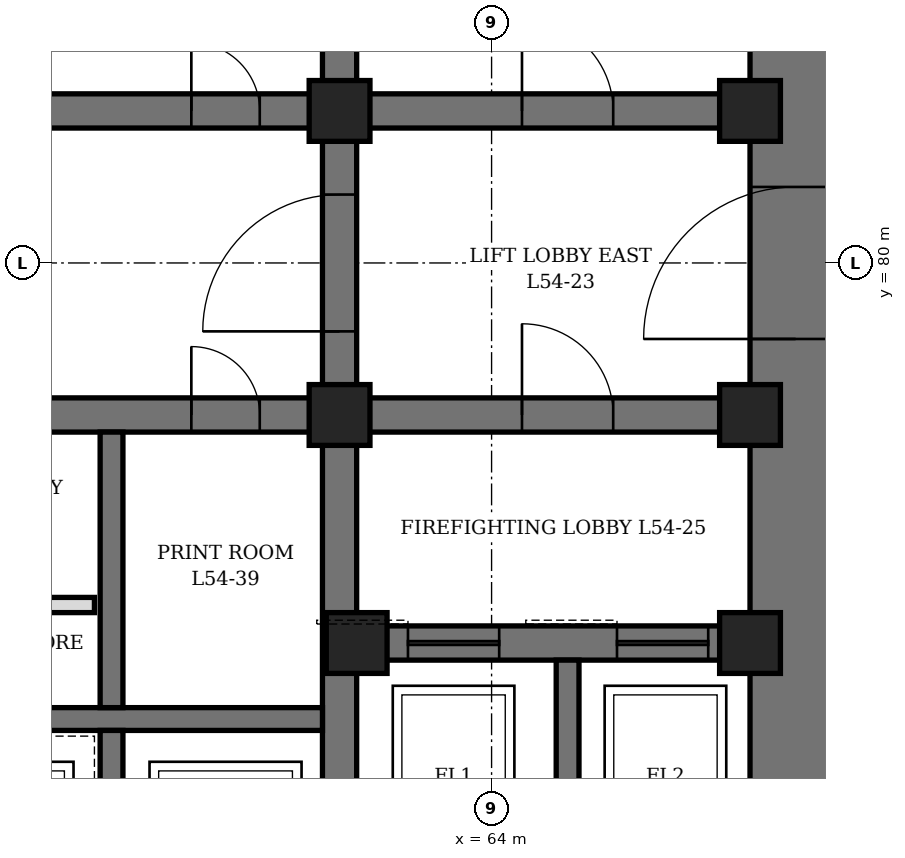
"""IFC4 building model, lengths in metres.
Left out: names, types, materials, properties, quantities, classifications, styles, units other than length and angle.
Written with IfcOpenShell. Run it as: python <this file> out.ifc"""

import sys

from ifc_helpers import new_model, si_unit, direction, frame, frame_2d, origin, origin_2d, place, context, subcontext, project, spatial, rectangle, hollow_rectangle, extrude, element, fill, save


model = new_model("IFC4")
c1 = context("Model", 3, precision=1e-05, world=origin(), true_north=direction((0.0, 1.0)))
c2 = subcontext(c1, "Body", "Model", "MODEL_VIEW")
j1 = project(units=[si_unit("LENGTHUNIT", "METRE"), si_unit("PLANEANGLEUNIT", "RADIAN")], contexts=[c1])
p1 = place(None, origin())
s1 = spatial("IfcSite", under=j1, at=p1, CompositionType="ELEMENT")
p2 = place(p1, origin())
s2 = spatial("IfcBuilding", under=s1, at=p2, CompositionType="ELEMENT")
p3 = place(p2, frame((0.0, 0.0, 240.1)))
s3 = spatial("IfcBuildingStorey", under=s2, at=p3, CompositionType="ELEMENT", Elevation=240.1)
p4 = place(p3, frame((68.0, 70.4, 0.0), z_axis=(0.0, 0.0, 1.0), x_axis=(0.0, 1.0, 0.0)))
e1 = element("IfcWall", 1, at=p4, inside=s3, PredefinedType="SHEAR", context=c2, shape_type="SweptSolid", body=[
    extrude(rectangle(XDim=19.2, YDim=1.2, at=frame_2d((9.6, 0.0))), origin(), (0.0, 0.0, 1.0), 4.2),
])
p5 = place(p4, frame((8.6, 0.0, 0.0)))
e2 = element("IfcOpeningElement", 2, at=p5, cuts=e1, PredefinedType="OPENING", context=c2, shape_type="SweptSolid", body=[
    extrude(rectangle(XDim=2.0, YDim=2.4, at=frame_2d((1.0, 1.2))), frame((0.0, 0.61, 0.0), z_axis=(0.0, -1.0, 0.0), x_axis=(1.0, 0.0, 0.0)), (0.0, 0.0, 1.0), 1.22),
])
p6 = place(p3, frame((62.0, 71.6, 0.0), z_axis=(0.0, 0.0, 1.0), x_axis=(0.0, 1.0, 0.0)))
e3 = element("IfcWall", 3, at=p6, inside=s3, PredefinedType="SHEAR", context=c2, shape_type="SweptSolid", body=[
    extrude(rectangle(XDim=16.8, YDim=0.45, at=frame_2d((8.4, 0.0))), origin(), (0.0, 0.0, 1.0), 4.2),
])
p7 = place(p6, frame((7.5, 0.0, 0.0)))
e4 = element("IfcOpeningElement", 4, at=p7, cuts=e3, PredefinedType="OPENING", context=c2, shape_type="SweptSolid", body=[
    extrude(rectangle(XDim=1.8, YDim=2.4, at=frame_2d((0.9, 1.2))), frame((0.0, 0.235, 0.0), z_axis=(0.0, -1.0, 0.0), x_axis=(1.0, 0.0, 0.0)), (0.0, 0.0, 1.0), 0.47),
])
p8 = place(p3, frame((62.225, 75.0, 0.0), z_axis=(0.0, 0.0, 1.0), x_axis=(1.0, 0.0, 0.0)))
e5 = element("IfcWall", 5, at=p8, inside=s3, PredefinedType="SHEAR", context=c2, shape_type="SweptSolid", body=[
    extrude(rectangle(XDim=5.175, YDim=0.45, at=frame_2d((2.587, 0.0))), origin(), (0.0, 0.0, 1.0), 4.2),
])
p9 = place(p8, frame((0.675, 0.0, 0.0)))
e6 = element("IfcOpeningElement", 6, at=p9, cuts=e5, PredefinedType="OPENING", context=c2, shape_type="SweptSolid", body=[
    extrude(rectangle(XDim=1.2, YDim=2.2, at=frame_2d((0.6, 1.1))), frame((0.0, 0.235, 0.0), z_axis=(0.0, -1.0, 0.0), x_axis=(1.0, 0.0, 0.0)), (0.0, 0.0, 1.0), 0.47),
])
p10 = place(p8, frame((3.425, 0.0, 0.0)))
e7 = element("IfcOpeningElement", 7, at=p10, cuts=e5, PredefinedType="OPENING", context=c2, shape_type="SweptSolid", body=[
    extrude(rectangle(XDim=1.2, YDim=2.2, at=frame_2d((0.6, 1.1))), frame((0.0, 0.235, 0.0), z_axis=(0.0, -1.0, 0.0), x_axis=(1.0, 0.0, 0.0)), (0.0, 0.0, 1.0), 0.47),
])
p11 = place(p3, frame((62.225, 78.0, 0.0), z_axis=(0.0, 0.0, 1.0), x_axis=(1.0, 0.0, 0.0)))
e8 = element("IfcWall", 8, at=p11, inside=s3, PredefinedType="SHEAR", context=c2, shape_type="SweptSolid", body=[
    extrude(rectangle(XDim=5.175, YDim=0.45, at=frame_2d((2.587, 0.0))), origin(), (0.0, 0.0, 1.0), 4.2),
])
p12 = place(p11, frame((2.175, 0.0, 0.0)))
e9 = element("IfcOpeningElement", 9, at=p12, cuts=e8, PredefinedType="OPENING", context=c2, shape_type="SweptSolid", body=[
    extrude(rectangle(XDim=1.2, YDim=2.1, at=frame_2d((0.6, 1.05))), frame((0.0, 0.235, 0.0), z_axis=(0.0, -1.0, 0.0), x_axis=(1.0, 0.0, 0.0)), (0.0, 0.0, 1.0), 0.47),
])
p13 = place(p3, frame((62.225, 82.0, 0.0), z_axis=(0.0, 0.0, 1.0), x_axis=(1.0, 0.0, 0.0)))
e10 = element("IfcWall", 10, at=p13, inside=s3, PredefinedType="SHEAR", context=c2, shape_type="SweptSolid", body=[
    extrude(rectangle(XDim=5.175, YDim=0.45, at=frame_2d((2.587, 0.0))), origin(), (0.0, 0.0, 1.0), 4.2),
])
p14 = place(p13, frame((2.175, 0.0, 0.0)))
e11 = element("IfcOpeningElement", 11, at=p14, cuts=e10, PredefinedType="OPENING", context=c2, shape_type="SweptSolid", body=[
    extrude(rectangle(XDim=1.2, YDim=2.1, at=frame_2d((0.6, 1.05))), frame((0.0, 0.235, 0.0), z_axis=(0.0, -1.0, 0.0), x_axis=(1.0, 0.0, 0.0)), (0.0, 0.0, 1.0), 0.47),
])
p15 = place(p3, frame((50.225, 78.0, 0.0), z_axis=(0.0, 0.0, 1.0), x_axis=(1.0, 0.0, 0.0)))
e12 = element("IfcWall", 12, at=p15, inside=s3, PredefinedType="SHEAR", context=c2, shape_type="SweptSolid", body=[
    extrude(rectangle(XDim=11.55, YDim=0.45, at=frame_2d((5.775, 0.0))), origin(), (0.0, 0.0, 1.0), 4.2),
])
p16 = place(p15, frame((0.825, 0.0, 0.0)))
e13 = element("IfcOpeningElement", 13, at=p16, cuts=e12, PredefinedType="OPENING", context=c2, shape_type="SweptSolid", body=[
    extrude(rectangle(XDim=0.9, YDim=2.1, at=frame_2d((0.45, 1.05))), frame((0.0, 0.235, 0.0), z_axis=(0.0, -1.0, 0.0), x_axis=(1.0, 0.0, 0.0)), (0.0, 0.0, 1.0), 0.47),
])
p17 = place(p15, frame((3.825, 0.0, 0.0)))
e14 = element("IfcOpeningElement", 14, at=p17, cuts=e12, PredefinedType="OPENING", context=c2, shape_type="SweptSolid", body=[
    extrude(rectangle(XDim=0.9, YDim=2.1, at=frame_2d((0.45, 1.05))), frame((0.0, 0.235, 0.0), z_axis=(0.0, -1.0, 0.0), x_axis=(1.0, 0.0, 0.0)), (0.0, 0.0, 1.0), 0.47),
])
p18 = place(p15, frame((6.825, 0.0, 0.0)))
e15 = element("IfcOpeningElement", 15, at=p18, cuts=e12, PredefinedType="OPENING", context=c2, shape_type="SweptSolid", body=[
    extrude(rectangle(XDim=0.9, YDim=2.1, at=frame_2d((0.45, 1.05))), frame((0.0, 0.235, 0.0), z_axis=(0.0, -1.0, 0.0), x_axis=(1.0, 0.0, 0.0)), (0.0, 0.0, 1.0), 0.47),
])
p19 = place(p15, frame((9.825, 0.0, 0.0)))
e16 = element("IfcOpeningElement", 16, at=p19, cuts=e12, PredefinedType="OPENING", context=c2, shape_type="SweptSolid", body=[
    extrude(rectangle(XDim=0.9, YDim=2.1, at=frame_2d((0.45, 1.05))), frame((0.0, 0.235, 0.0), z_axis=(0.0, -1.0, 0.0), x_axis=(1.0, 0.0, 0.0)), (0.0, 0.0, 1.0), 0.47),
])
p20 = place(p3, frame((50.225, 82.0, 0.0), z_axis=(0.0, 0.0, 1.0), x_axis=(1.0, 0.0, 0.0)))
e17 = element("IfcWall", 17, at=p20, inside=s3, PredefinedType="SHEAR", context=c2, shape_type="SweptSolid", body=[
    extrude(rectangle(XDim=11.55, YDim=0.45, at=frame_2d((5.775, 0.0))), origin(), (0.0, 0.0, 1.0), 4.2),
])
p21 = place(p20, frame((0.825, 0.0, 0.0)))
e18 = element("IfcOpeningElement", 18, at=p21, cuts=e17, PredefinedType="OPENING", context=c2, shape_type="SweptSolid", body=[
    extrude(rectangle(XDim=0.9, YDim=2.1, at=frame_2d((0.45, 1.05))), frame((0.0, 0.235, 0.0), z_axis=(0.0, -1.0, 0.0), x_axis=(1.0, 0.0, 0.0)), (0.0, 0.0, 1.0), 0.47),
])
p22 = place(p20, frame((3.825, 0.0, 0.0)))
e19 = element("IfcOpeningElement", 19, at=p22, cuts=e17, PredefinedType="OPENING", context=c2, shape_type="SweptSolid", body=[
    extrude(rectangle(XDim=0.9, YDim=2.1, at=frame_2d((0.45, 1.05))), frame((0.0, 0.235, 0.0), z_axis=(0.0, -1.0, 0.0), x_axis=(1.0, 0.0, 0.0)), (0.0, 0.0, 1.0), 0.47),
])
p23 = place(p20, frame((6.825, 0.0, 0.0)))
e20 = element("IfcOpeningElement", 20, at=p23, cuts=e17, PredefinedType="OPENING", context=c2, shape_type="SweptSolid", body=[
    extrude(rectangle(XDim=0.9, YDim=2.1, at=frame_2d((0.45, 1.05))), frame((0.0, 0.235, 0.0), z_axis=(0.0, -1.0, 0.0), x_axis=(1.0, 0.0, 0.0)), (0.0, 0.0, 1.0), 0.47),
])
p24 = place(p20, frame((9.825, 0.0, 0.0)))
e21 = element("IfcOpeningElement", 21, at=p24, cuts=e17, PredefinedType="OPENING", context=c2, shape_type="SweptSolid", body=[
    extrude(rectangle(XDim=0.9, YDim=2.1, at=frame_2d((0.45, 1.05))), frame((0.0, 0.235, 0.0), z_axis=(0.0, -1.0, 0.0), x_axis=(1.0, 0.0, 0.0)), (0.0, 0.0, 1.0), 0.47),
])
p25 = place(p3, frame((50.225, 74.0, 0.0), z_axis=(0.0, 0.0, 1.0), x_axis=(1.0, 0.0, 0.0)))
e22 = element("IfcWall", 22, at=p25, inside=s3, PredefinedType="SHEAR", context=c2, shape_type="SweptSolid", body=[
    extrude(rectangle(XDim=11.55, YDim=0.3, at=frame_2d((5.775, 0.0))), origin(), (0.0, 0.0, 1.0), 4.2),
])
p26 = place(p3, frame((59.0, 71.6, 0.0), z_axis=(0.0, 0.0, 1.0), x_axis=(0.0, 1.0, 0.0)))
e23 = element("IfcWall", 23, at=p26, inside=s3, PredefinedType="SHEAR", context=c2, shape_type="SweptSolid", body=[
    extrude(rectangle(XDim=2.25, YDim=0.3, at=frame_2d((1.125, 0.0))), origin(), (0.0, 0.0, 1.0), 4.2),
])
p27 = place(p3, frame((59.0, 74.15, 0.0), z_axis=(0.0, 0.0, 1.0), x_axis=(0.0, 1.0, 0.0)))
e24 = element("IfcWall", 24, at=p27, inside=s3, PredefinedType="SHEAR", context=c2, shape_type="SweptSolid", body=[
    extrude(rectangle(XDim=3.625, YDim=0.3, at=frame_2d((1.812, 0.0))), origin(), (0.0, 0.0, 1.0), 4.2),
])
p28 = place(p3, frame((65.0, 71.6, 0.0), z_axis=(0.0, 0.0, 1.0), x_axis=(0.0, 1.0, 0.0)))
e25 = element("IfcWall", 25, at=p28, inside=s3, PredefinedType="SHEAR", context=c2, shape_type="SweptSolid", body=[
    extrude(rectangle(XDim=3.175, YDim=0.3, at=frame_2d((1.587, 0.0))), origin(), (0.0, 0.0, 1.0), 4.2),
])
for number, where, z_axis, x_axis in (
    (26, (62.0, 78.0, 0.0), (0.0, 0.0, 1.0), (1.0, 0.0, 0.0)),
    (27, (62.0, 82.0, 0.0), (0.0, 0.0, 1.0), (1.0, 0.0, 0.0)),
    (28, (62.225, 75.0, 0.0), (0.0, 0.0, 1.0), (1.0, 0.0, 0.0)),
    (29, (67.4, 75.0, 0.0), (0.0, 0.0, 1.0), (1.0, 0.0, 0.0)),
    (30, (67.4, 78.0, 0.0), (0.0, 0.0, 1.0), (1.0, 0.0, 0.0)),
    (31, (67.4, 82.0, 0.0), (0.0, 0.0, 1.0), (1.0, 0.0, 0.0)),
):
    element("IfcColumn", number, at=place(p3, frame(where, z_axis=z_axis, x_axis=x_axis)), inside=s3, PredefinedType="COLUMN", context=c2, shape_type="SweptSolid", body=[
        extrude(hollow_rectangle(XDim=0.8, YDim=0.8, WallThickness=0.1, at=origin_2d()), origin(), (0.0, 0.0, 1.0), 4.2),
    ])
p29 = place(p3, frame((56.225, 75.5, 0.0), z_axis=(0.0, 0.0, 1.0), x_axis=(1.0, 0.0, 0.0)))
e32 = element("IfcWall", 32, at=p29, inside=s3, PredefinedType="PARTITIONING", context=c2, shape_type="SweptSolid", body=[
    extrude(rectangle(XDim=2.55, YDim=0.2, at=frame_2d((1.275, 0.0))), origin(), (0.0, 0.0, 1.0), 3.95),
])
p30 = place(p29, frame((0.825, 0.0, 0.0)))
e33 = element("IfcOpeningElement", 33, at=p30, cuts=e32, PredefinedType="OPENING", context=c2, shape_type="SweptSolid", body=[
    extrude(rectangle(XDim=0.9, YDim=2.1, at=frame_2d((0.45, 1.05))), frame((0.0, 0.11, 0.0), z_axis=(0.0, -1.0, 0.0), x_axis=(1.0, 0.0, 0.0)), (0.0, 0.0, 1.0), 0.22),
])
p31 = place(p19, origin())
e34 = element("IfcDoor", 34, at=p31, inside=s3, OperationType="SINGLE_SWING_LEFT", PredefinedType="DOOR", context=c2, shape_type="SweptSolid", body=[
    extrude(rectangle(XDim=0.9, YDim=2.1, at=frame_2d((0.45, 1.05))), frame((0.0, 0.225, 0.0), z_axis=(0.0, -1.0, 0.0), x_axis=(1.0, 0.0, 0.0)), (0.0, 0.0, 1.0), 0.449),
])
fill(e16, e34)
p32 = place(p24, origin())
e35 = element("IfcDoor", 35, at=p32, inside=s3, OperationType="SINGLE_SWING_LEFT", PredefinedType="DOOR", context=c2, shape_type="SweptSolid", body=[
    extrude(rectangle(XDim=0.9, YDim=2.1, at=frame_2d((0.45, 1.05))), frame((0.0, 0.225, 0.0), z_axis=(0.0, -1.0, 0.0), x_axis=(1.0, 0.0, 0.0)), (0.0, 0.0, 1.0), 0.449),
])
fill(e21, e35)
p33 = place(p14, origin())
e36 = element("IfcDoor", 36, at=p33, inside=s3, OperationType="SINGLE_SWING_LEFT", PredefinedType="DOOR", context=c2, shape_type="SweptSolid", body=[
    extrude(rectangle(XDim=1.2, YDim=2.1, at=frame_2d((0.6, 1.05))), frame((0.0, 0.225, 0.0), z_axis=(0.0, -1.0, 0.0), x_axis=(1.0, 0.0, 0.0)), (0.0, 0.0, 1.0), 0.449),
])
fill(e11, e36)
p34 = place(p5, origin())
e37 = element("IfcDoor", 37, at=p34, inside=s3, OperationType="DOUBLE_DOOR_SINGLE_SWING", PredefinedType="DOOR", context=c2, shape_type="SweptSolid", body=[
    extrude(rectangle(XDim=2.0, YDim=2.4, at=frame_2d((1.0, 1.2))), frame((0.0, 0.35, 0.0), z_axis=(0.0, -1.0, 0.0), x_axis=(1.0, 0.0, 0.0)), (0.0, 0.0, 1.0), 0.7),
])
fill(e2, e37)
p35 = place(p7, origin())
e38 = element("IfcDoor", 38, at=p35, inside=s3, OperationType="DOUBLE_DOOR_SINGLE_SWING", PredefinedType="DOOR", context=c2, shape_type="SweptSolid", body=[
    extrude(rectangle(XDim=1.8, YDim=2.4, at=frame_2d((0.9, 1.2))), frame((0.0, 0.225, 0.0), z_axis=(0.0, -1.0, 0.0), x_axis=(1.0, 0.0, 0.0)), (0.0, 0.0, 1.0), 0.449),
])
fill(e4, e38)
p36 = place(p12, origin())
e39 = element("IfcDoor", 39, at=p36, inside=s3, OperationType="SINGLE_SWING_RIGHT", PredefinedType="DOOR", context=c2, shape_type="SweptSolid", body=[
    extrude(rectangle(XDim=1.2, YDim=2.1, at=frame_2d((0.6, 1.05))), frame((0.0, 0.225, 0.0), z_axis=(0.0, -1.0, 0.0), x_axis=(1.0, 0.0, 0.0)), (0.0, 0.0, 1.0), 0.449),
])
fill(e9, e39)
p37 = place(p9, origin())
e40 = element("IfcDoor", 40, at=p37, inside=s3, OperationType="SLIDING_TO_LEFT", PredefinedType="DOOR", context=c2, shape_type="SweptSolid", body=[
    extrude(rectangle(XDim=1.2, YDim=2.2, at=frame_2d((0.6, 1.1))), frame((0.0, 0.225, 0.0), z_axis=(0.0, -1.0, 0.0), x_axis=(1.0, 0.0, 0.0)), (0.0, 0.0, 1.0), 0.449),
])
fill(e6, e40)
p38 = place(p10, origin())
e41 = element("IfcDoor", 41, at=p38, inside=s3, OperationType="SLIDING_TO_LEFT", PredefinedType="DOOR", context=c2, shape_type="SweptSolid", body=[
    extrude(rectangle(XDim=1.2, YDim=2.2, at=frame_2d((0.6, 1.1))), frame((0.0, 0.225, 0.0), z_axis=(0.0, -1.0, 0.0), x_axis=(1.0, 0.0, 0.0)), (0.0, 0.0, 1.0), 0.449),
])
fill(e7, e41)
save(model, sys.argv[1])
